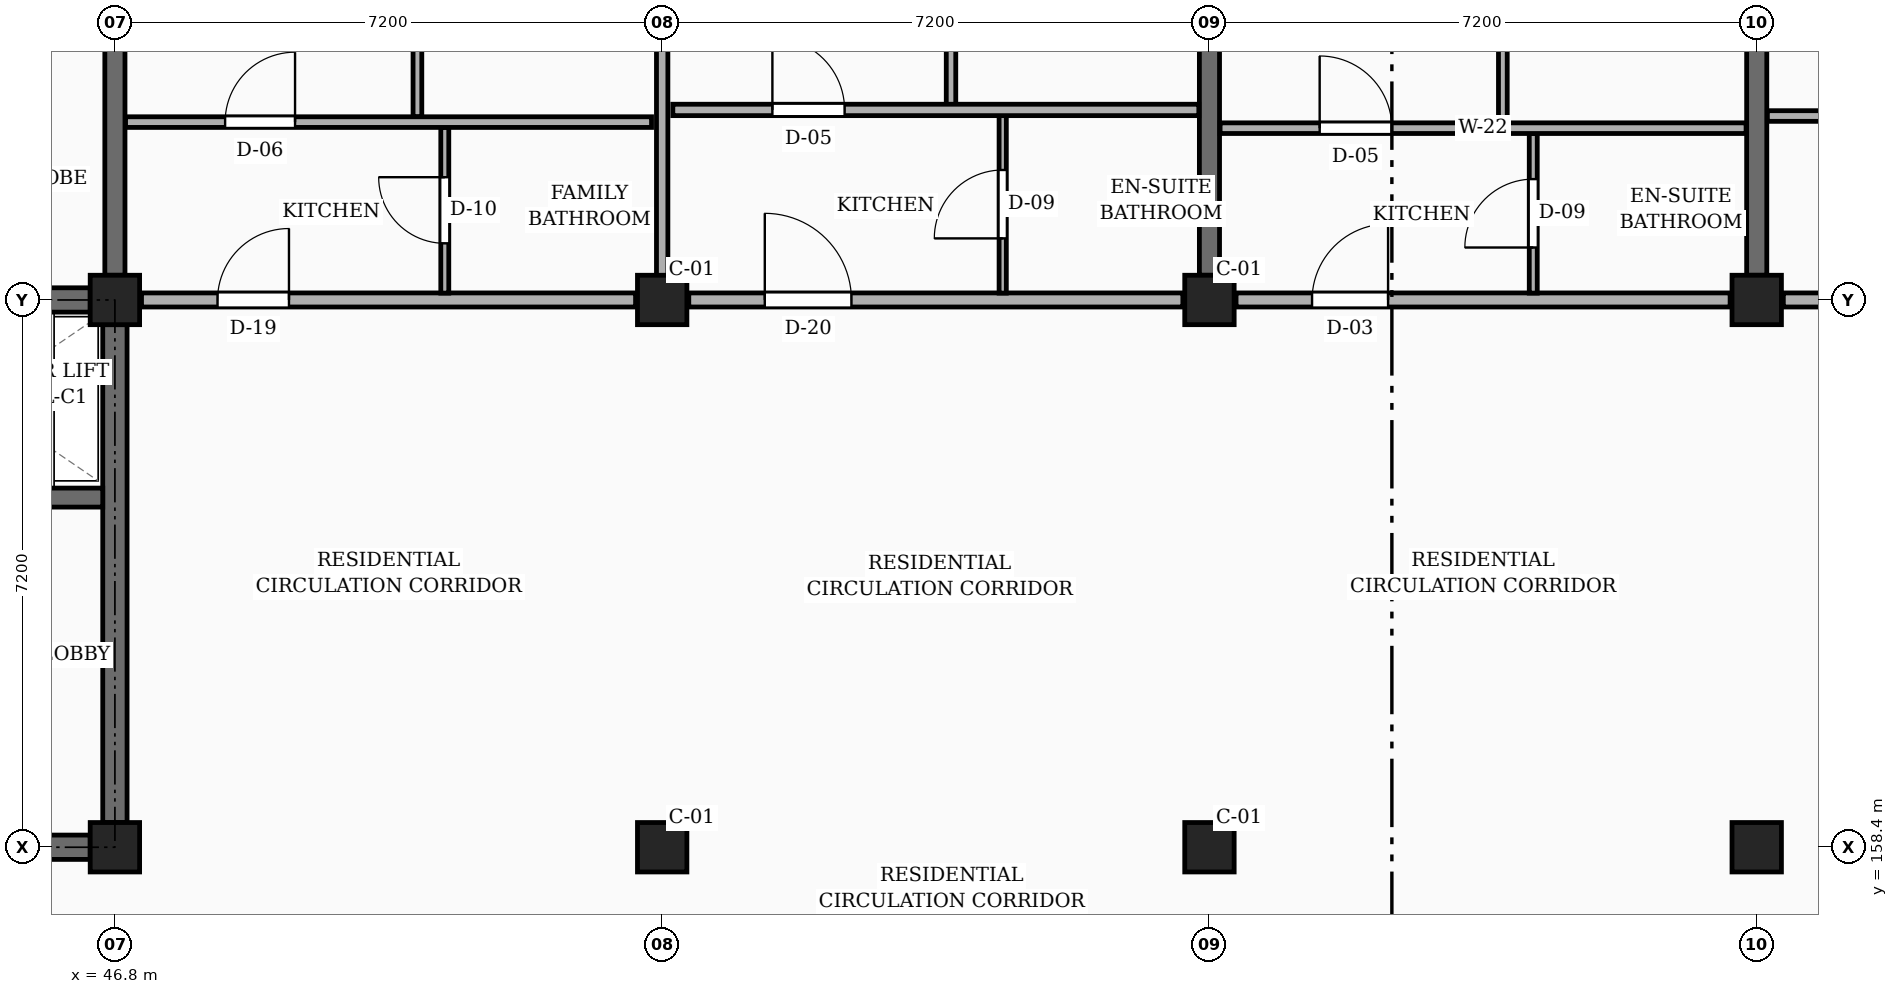
"""IFC4 building model, lengths in metres.
Left out: names, types, materials, properties, quantities, classifications, styles, units other than length and angle.
Written with IfcOpenShell. Run it as: python <this file> out.ifc"""

import sys

from ifc_helpers import new_model, si_unit, direction, frame, frame_2d, origin, origin_2d, place, context, subcontext, project, spatial, rectangle, extrude, element, fill, save


model = new_model("IFC4")
c1 = context("Model", 3, precision=1e-05, world=origin(), true_north=direction((0.0, 1.0)))
c2 = subcontext(c1, "Body", "Model", "MODEL_VIEW")
j1 = project(units=[si_unit("LENGTHUNIT", "METRE"), si_unit("PLANEANGLEUNIT", "RADIAN")], contexts=[c1])
p1 = place(None, origin())
s1 = spatial("IfcSite", under=j1, at=p1, CompositionType="ELEMENT")
p2 = place(p1, origin())
s2 = spatial("IfcBuilding", under=s1, at=p2, CompositionType="ELEMENT")
p3 = place(p2, origin())
s3 = spatial("IfcBuildingStorey", under=s2, at=p3, CompositionType="ELEMENT", Elevation=0.0)
for number, where, z_axis, x_axis in (
    (1, (46.8, 158.4, 0.0), (0.0, 0.0, 1.0), (1.0, 0.0, 0.0)),
    (2, (46.8, 165.6, 0.0), (0.0, 0.0, 1.0), (1.0, 0.0, 0.0)),
    (3, (54.0, 158.4, 0.0), (0.0, 0.0, 1.0), (1.0, 0.0, 0.0)),
    (4, (54.0, 165.6, 0.0), (0.0, 0.0, 1.0), (1.0, 0.0, 0.0)),
    (5, (61.2, 158.4, 0.0), (0.0, 0.0, 1.0), (1.0, 0.0, 0.0)),
    (6, (61.2, 165.6, 0.0), (0.0, 0.0, 1.0), (1.0, 0.0, 0.0)),
    (7, (68.4, 158.4, 0.0), (0.0, 0.0, 1.0), (1.0, 0.0, 0.0)),
    (8, (68.4, 165.6, 0.0), (0.0, 0.0, 1.0), (1.0, 0.0, 0.0)),
):
    element("IfcColumn", number, at=place(p3, frame(where, z_axis=z_axis, x_axis=x_axis)), inside=s3, PredefinedType="COLUMN", context=c2, shape_type="SweptSolid", body=[
        extrude(rectangle(XDim=0.65, YDim=0.65, at=origin_2d()), origin(), (0.0, 0.0, 1.0), 4.5),
    ])
for number, where, z_axis, x_axis in (
    (9, (46.8, 165.925, 0.0), (0.0, 0.0, 1.0), (0.0, 1.0, 0.0)),
    (10, (61.2, 165.925, 0.0), (0.0, 0.0, 1.0), (0.0, 1.0, 0.0)),
    (11, (68.4, 165.925, 0.0), (0.0, 0.0, 1.0), (0.0, 1.0, 0.0)),
):
    element("IfcWall", number, at=place(p3, frame(where, z_axis=z_axis, x_axis=x_axis)), inside=s3, PredefinedType="SOLIDWALL", context=c2, shape_type="SweptSolid", body=[
        extrude(rectangle(XDim=6.575, YDim=0.265, at=frame_2d((3.288, 0.0))), origin(), (0.0, 0.0, 1.0), 3.535),
    ])
p4 = place(p3, frame((39.925, 165.6, 0.0), z_axis=(0.0, 0.0, 1.0), x_axis=(1.0, 0.0, 0.0)))
e12 = element("IfcWall", 12, at=p4, inside=s3, PredefinedType="SHEAR", context=c2, shape_type="SweptSolid", body=[
    extrude(rectangle(XDim=6.55, YDim=0.32, at=frame_2d((3.275, 0.0))), origin(), (0.0, 0.0, 1.0), 4.235),
])
p5 = place(p3, frame((46.8, 158.725, 0.0), z_axis=(0.0, 0.0, 1.0), x_axis=(0.0, 1.0, 0.0)))
e13 = element("IfcWall", 13, at=p5, inside=s3, PredefinedType="SHEAR", context=c2, shape_type="SweptSolid", body=[
    extrude(rectangle(XDim=6.55, YDim=0.32, at=frame_2d((3.275, 0.0))), origin(), (0.0, 0.0, 1.0), 4.235),
])
p6 = place(p3, frame((39.925, 158.4, 0.0), z_axis=(0.0, 0.0, 1.0), x_axis=(1.0, 0.0, 0.0)))
e14 = element("IfcWall", 14, at=p6, inside=s3, PredefinedType="SHEAR", context=c2, shape_type="SweptSolid", body=[
    extrude(rectangle(XDim=6.55, YDim=0.32, at=frame_2d((3.275, 0.0))), origin(), (0.0, 0.0, 1.0), 4.235),
])
p7 = place(p6, frame((4.425, 0.0, 0.0)))
e15 = element("IfcOpeningElement", 15, at=p7, cuts=e14, PredefinedType="OPENING", context=c2, shape_type="SweptSolid", body=[
    extrude(rectangle(XDim=1.1, YDim=2.15, at=frame_2d((0.55, 1.075))), frame((0.0, 0.17, 0.0), z_axis=(0.0, -1.0, 0.0), x_axis=(1.0, 0.0, 0.0)), (0.0, 0.0, 1.0), 0.34),
])
p8 = place(p3, frame((43.325, 163.0, 0.0), z_axis=(0.0, 0.0, 1.0), x_axis=(1.0, 0.0, 0.0)))
e16 = element("IfcWall", 16, at=p8, inside=s3, PredefinedType="SHEAR", context=c2, shape_type="SweptSolid", body=[
    extrude(rectangle(XDim=3.315, YDim=0.25, at=frame_2d((1.657, 0.0))), origin(), (0.0, 0.0, 1.0), 4.235),
])
p9 = place(p8, frame((1.1, 0.0, 0.0)))
e17 = element("IfcOpeningElement", 17, at=p9, cuts=e16, PredefinedType="OPENING", context=c2, shape_type="SweptSolid", body=[
    extrude(rectangle(XDim=1.0, YDim=2.2, at=frame_2d((0.5, 1.1))), frame((0.0, 0.135, 0.0), z_axis=(0.0, -1.0, 0.0), x_axis=(1.0, 0.0, 0.0)), (0.0, 0.0, 1.0), 0.27),
])
p10 = place(p3, frame((47.15, 165.6, 0.0), z_axis=(0.0, 0.0, 1.0), x_axis=(1.0, 0.0, 0.0)))
e18 = element("IfcWall", 18, at=p10, inside=s3, PredefinedType="PARTITIONING", context=c2, shape_type="SweptSolid", body=[
    extrude(rectangle(XDim=6.5, YDim=0.185, at=frame_2d((3.25, 0.0))), origin(), (0.0, 0.0, 1.0), 3.435),
])
p11 = place(p10, frame((1.0, 0.0, 0.0)))
e19 = element("IfcOpeningElement", 19, at=p11, cuts=e18, PredefinedType="OPENING", context=c2, shape_type="SweptSolid", body=[
    extrude(rectangle(XDim=0.94, YDim=2.12, at=frame_2d((0.47, 1.06))), frame((0.0, 0.103, 0.0), z_axis=(0.0, -1.0, 0.0), x_axis=(1.0, 0.0, 0.0)), (0.0, 0.0, 1.0), 0.205),
])
p12 = place(p3, frame((54.35, 165.6, 0.0), z_axis=(0.0, 0.0, 1.0), x_axis=(1.0, 0.0, 0.0)))
e20 = element("IfcWall", 20, at=p12, inside=s3, PredefinedType="PARTITIONING", context=c2, shape_type="SweptSolid", body=[
    extrude(rectangle(XDim=6.5, YDim=0.185, at=frame_2d((3.25, 0.0))), origin(), (0.0, 0.0, 1.0), 3.435),
])
p13 = place(p12, frame((1.0, 0.0, 0.0)))
e21 = element("IfcOpeningElement", 21, at=p13, cuts=e20, PredefinedType="OPENING", context=c2, shape_type="SweptSolid", body=[
    extrude(rectangle(XDim=1.14, YDim=2.18, at=frame_2d((0.57, 1.09))), frame((0.0, 0.103, 0.0), z_axis=(0.0, -1.0, 0.0), x_axis=(1.0, 0.0, 0.0)), (0.0, 0.0, 1.0), 0.205),
])
p14 = place(p3, frame((61.55, 165.6, 0.0), z_axis=(0.0, 0.0, 1.0), x_axis=(1.0, 0.0, 0.0)))
e22 = element("IfcWall", 22, at=p14, inside=s3, PredefinedType="PARTITIONING", context=c2, shape_type="SweptSolid", body=[
    extrude(rectangle(XDim=6.5, YDim=0.185, at=frame_2d((3.25, 0.0))), origin(), (0.0, 0.0, 1.0), 3.435),
])
p15 = place(p14, frame((1.0, 0.0, 0.0)))
e23 = element("IfcOpeningElement", 23, at=p15, cuts=e22, PredefinedType="OPENING", context=c2, shape_type="SweptSolid", body=[
    extrude(rectangle(XDim=1.0, YDim=2.15, at=frame_2d((0.5, 1.075))), frame((0.0, 0.103, 0.0), z_axis=(0.0, -1.0, 0.0), x_axis=(1.0, 0.0, 0.0)), (0.0, 0.0, 1.0), 0.205),
])
p16 = place(p3, frame((68.75, 165.6, 0.0), z_axis=(0.0, 0.0, 1.0), x_axis=(1.0, 0.0, 0.0)))
e24 = element("IfcWall", 24, at=p16, inside=s3, PredefinedType="PARTITIONING", context=c2, shape_type="SweptSolid", body=[
    extrude(rectangle(XDim=6.5, YDim=0.185, at=frame_2d((3.25, 0.0))), origin(), (0.0, 0.0, 1.0), 3.435),
])
p17 = place(p16, frame((1.0, 0.0, 0.0)))
e25 = element("IfcOpeningElement", 25, at=p17, cuts=e24, PredefinedType="OPENING", context=c2, shape_type="SweptSolid", body=[
    extrude(rectangle(XDim=0.94, YDim=2.12, at=frame_2d((0.47, 1.06))), frame((0.0, 0.103, 0.0), z_axis=(0.0, -1.0, 0.0), x_axis=(1.0, 0.0, 0.0)), (0.0, 0.0, 1.0), 0.205),
])
p18 = place(p3, frame((54.0, 165.69, 0.0), z_axis=(0.0, 0.0, 1.0), x_axis=(0.0, 1.0, 0.0)))
e26 = element("IfcWall", 26, at=p18, inside=s3, PredefinedType="PARTITIONING", context=c2, shape_type="SweptSolid", body=[
    extrude(rectangle(XDim=6.935, YDim=0.15, at=frame_2d((3.468, 0.0))), origin(), (0.0, 0.0, 1.0), 3.485),
])
p19 = place(p3, frame((50.78, 168.01, 0.0), z_axis=(0.0, 0.0, 1.0), x_axis=(0.0, 1.0, 0.0)))
e27 = element("IfcWall", 27, at=p19, inside=s3, PredefinedType="PARTITIONING", context=c2, shape_type="SweptSolid", body=[
    extrude(rectangle(XDim=4.615, YDim=0.115, at=frame_2d((2.308, 0.0))), origin(), (0.0, 0.0, 1.0), 3.67),
])
p20 = place(p19, frame((1.867, 0.0, 0.0)))
e28 = element("IfcOpeningElement", 28, at=p20, cuts=e27, PredefinedType="OPENING", context=c2, shape_type="SweptSolid", body=[
    extrude(rectangle(XDim=0.88, YDim=2.08, at=frame_2d((0.44, 1.04))), frame((0.0, 0.067, 0.0), z_axis=(0.0, -1.0, 0.0), x_axis=(1.0, 0.0, 0.0)), (0.0, 0.0, 1.0), 0.135),
])
p21 = place(p3, frame((51.14, 165.69, 0.0), z_axis=(0.0, 0.0, 1.0), x_axis=(0.0, 1.0, 0.0)))
e29 = element("IfcWall", 29, at=p21, inside=s3, PredefinedType="PARTITIONING", context=c2, shape_type="SweptSolid", body=[
    extrude(rectangle(XDim=2.18, YDim=0.105, at=frame_2d((1.09, 0.0))), origin(), (0.0, 0.0, 1.0), 3.67),
])
p22 = place(p21, frame((0.655, 0.0, 0.0)))
e30 = element("IfcOpeningElement", 30, at=p22, cuts=e29, PredefinedType="OPENING", context=c2, shape_type="SweptSolid", body=[
    extrude(rectangle(XDim=0.87, YDim=2.05, at=frame_2d((0.435, 1.025))), frame((0.0, 0.062, 0.0), z_axis=(0.0, -1.0, 0.0), x_axis=(1.0, 0.0, 0.0)), (0.0, 0.0, 1.0), 0.125),
])
p23 = place(p3, frame((46.94, 167.94, 0.0), z_axis=(0.0, 0.0, 1.0), x_axis=(1.0, 0.0, 0.0)))
e31 = element("IfcWall", 31, at=p23, inside=s3, PredefinedType="PARTITIONING", context=c2, shape_type="SweptSolid", body=[
    extrude(rectangle(XDim=6.92, YDim=0.14, at=frame_2d((3.46, 0.0))), origin(), (0.0, 0.0, 1.0), 3.67),
])
p24 = place(p23, frame((1.31, 0.0, 0.0)))
e32 = element("IfcOpeningElement", 32, at=p24, cuts=e31, PredefinedType="OPENING", context=c2, shape_type="SweptSolid", body=[
    extrude(rectangle(XDim=0.92, YDim=2.1, at=frame_2d((0.46, 1.05))), frame((0.0, 0.08, 0.0), z_axis=(0.0, -1.0, 0.0), x_axis=(1.0, 0.0, 0.0)), (0.0, 0.0, 1.0), 0.16),
])
p25 = place(p3, frame((57.8, 168.17, 0.0), z_axis=(0.0, 0.0, 1.0), x_axis=(0.0, 1.0, 0.0)))
e33 = element("IfcWall", 33, at=p25, inside=s3, PredefinedType="PARTITIONING", context=c2, shape_type="SweptSolid", body=[
    extrude(rectangle(XDim=4.455, YDim=0.125, at=frame_2d((2.228, 0.0))), origin(), (0.0, 0.0, 1.0), 3.67),
])
p26 = place(p25, frame((1.778, 0.0, 0.0)))
e34 = element("IfcOpeningElement", 34, at=p26, cuts=e33, PredefinedType="OPENING", context=c2, shape_type="SweptSolid", body=[
    extrude(rectangle(XDim=0.9, YDim=2.1, at=frame_2d((0.45, 1.05))), frame((0.0, 0.073, 0.0), z_axis=(0.0, -1.0, 0.0), x_axis=(1.0, 0.0, 0.0)), (0.0, 0.0, 1.0), 0.145),
])
p27 = place(p3, frame((58.48, 165.69, 0.0), z_axis=(0.0, 0.0, 1.0), x_axis=(0.0, 1.0, 0.0)))
e35 = element("IfcWall", 35, at=p27, inside=s3, PredefinedType="PARTITIONING", context=c2, shape_type="SweptSolid", body=[
    extrude(rectangle(XDim=2.34, YDim=0.095, at=frame_2d((1.17, 0.0))), origin(), (0.0, 0.0, 1.0), 3.67),
])
p28 = place(p27, frame((0.72, 0.0, 0.0)))
e36 = element("IfcOpeningElement", 36, at=p28, cuts=e35, PredefinedType="OPENING", context=c2, shape_type="SweptSolid", body=[
    extrude(rectangle(XDim=0.9, YDim=2.05, at=frame_2d((0.45, 1.025))), frame((0.0, 0.058, 0.0), z_axis=(0.0, -1.0, 0.0), x_axis=(1.0, 0.0, 0.0)), (0.0, 0.0, 1.0), 0.115),
])
p29 = place(p3, frame((54.14, 168.1, 0.0), z_axis=(0.0, 0.0, 1.0), x_axis=(1.0, 0.0, 0.0)))
e37 = element("IfcWall", 37, at=p29, inside=s3, PredefinedType="PARTITIONING", context=c2, shape_type="SweptSolid", body=[
    extrude(rectangle(XDim=6.92, YDim=0.15, at=frame_2d((3.46, 0.0))), origin(), (0.0, 0.0, 1.0), 3.67),
])
p30 = place(p29, frame((1.31, 0.0, 0.0)))
e38 = element("IfcOpeningElement", 38, at=p30, cuts=e37, PredefinedType="OPENING", context=c2, shape_type="SweptSolid", body=[
    extrude(rectangle(XDim=0.95, YDim=2.1, at=frame_2d((0.475, 1.05))), frame((0.0, 0.085, 0.0), z_axis=(0.0, -1.0, 0.0), x_axis=(1.0, 0.0, 0.0)), (0.0, 0.0, 1.0), 0.17),
])
p31 = place(p3, frame((65.06, 167.93, 0.0), z_axis=(0.0, 0.0, 1.0), x_axis=(0.0, 1.0, 0.0)))
e39 = element("IfcWall", 39, at=p31, inside=s3, PredefinedType="PARTITIONING", context=c2, shape_type="SweptSolid", body=[
    extrude(rectangle(XDim=4.695, YDim=0.115, at=frame_2d((2.348, 0.0))), origin(), (0.0, 0.0, 1.0), 3.67),
])
p32 = place(p31, frame((1.897, 0.0, 0.0)))
e40 = element("IfcOpeningElement", 40, at=p32, cuts=e39, PredefinedType="OPENING", context=c2, shape_type="SweptSolid", body=[
    extrude(rectangle(XDim=0.9, YDim=2.1, at=frame_2d((0.45, 1.05))), frame((0.0, 0.067, 0.0), z_axis=(0.0, -1.0, 0.0), x_axis=(1.0, 0.0, 0.0)), (0.0, 0.0, 1.0), 0.135),
])
p33 = place(p3, frame((65.46, 165.69, 0.0), z_axis=(0.0, 0.0, 1.0), x_axis=(0.0, 1.0, 0.0)))
e41 = element("IfcWall", 41, at=p33, inside=s3, PredefinedType="PARTITIONING", context=c2, shape_type="SweptSolid", body=[
    extrude(rectangle(XDim=2.1, YDim=0.105, at=frame_2d((1.05, 0.0))), origin(), (0.0, 0.0, 1.0), 3.67),
])
p34 = place(p33, frame((0.6, 0.0, 0.0)))
e42 = element("IfcOpeningElement", 42, at=p34, cuts=e41, PredefinedType="OPENING", context=c2, shape_type="SweptSolid", body=[
    extrude(rectangle(XDim=0.9, YDim=2.05, at=frame_2d((0.45, 1.025))), frame((0.0, 0.062, 0.0), z_axis=(0.0, -1.0, 0.0), x_axis=(1.0, 0.0, 0.0)), (0.0, 0.0, 1.0), 0.125),
])
p35 = place(p3, frame((61.34, 167.86, 0.0), z_axis=(0.0, 0.0, 1.0), x_axis=(1.0, 0.0, 0.0)))
e43 = element("IfcWall", 43, at=p35, inside=s3, PredefinedType="PARTITIONING", context=c2, shape_type="SweptSolid", body=[
    extrude(rectangle(XDim=6.92, YDim=0.14, at=frame_2d((3.46, 0.0))), origin(), (0.0, 0.0, 1.0), 3.67),
])
p36 = place(p35, frame((1.31, 0.0, 0.0)))
e44 = element("IfcOpeningElement", 44, at=p36, cuts=e43, PredefinedType="OPENING", context=c2, shape_type="SweptSolid", body=[
    extrude(rectangle(XDim=0.95, YDim=2.1, at=frame_2d((0.475, 1.05))), frame((0.0, 0.08, 0.0), z_axis=(0.0, -1.0, 0.0), x_axis=(1.0, 0.0, 0.0)), (0.0, 0.0, 1.0), 0.16),
])
p37 = place(p3, frame((68.54, 168.02, 0.0), z_axis=(0.0, 0.0, 1.0), x_axis=(1.0, 0.0, 0.0)))
e45 = element("IfcWall", 45, at=p37, inside=s3, PredefinedType="PARTITIONING", context=c2, shape_type="SweptSolid", body=[
    extrude(rectangle(XDim=6.885, YDim=0.14, at=frame_2d((3.442, 0.0))), origin(), (0.0, 0.0, 1.0), 3.67),
])
p38 = place(p37, frame((1.31, 0.0, 0.0)))
e46 = element("IfcOpeningElement", 46, at=p38, cuts=e45, PredefinedType="OPENING", context=c2, shape_type="SweptSolid", body=[
    extrude(rectangle(XDim=0.92, YDim=2.1, at=frame_2d((0.46, 1.05))), frame((0.0, 0.08, 0.0), z_axis=(0.0, -1.0, 0.0), x_axis=(1.0, 0.0, 0.0)), (0.0, 0.0, 1.0), 0.16),
])
p39 = place(p11, origin())
e47 = element("IfcDoor", 47, at=p39, inside=s3, OperationType="SINGLE_SWING_RIGHT", PredefinedType="DOOR", context=c2, shape_type="SweptSolid", body=[
    extrude(rectangle(XDim=0.94, YDim=2.12, at=frame_2d((0.47, 1.06))), frame((0.0, 0.025, 0.0), z_axis=(0.0, -1.0, 0.0), x_axis=(1.0, 0.0, 0.0)), (0.0, 0.0, 1.0), 0.05),
])
fill(e19, e47)
p40 = place(p13, origin())
e48 = element("IfcDoor", 48, at=p40, inside=s3, OperationType="SINGLE_SWING_LEFT", PredefinedType="DOOR", context=c2, shape_type="SweptSolid", body=[
    extrude(rectangle(XDim=1.14, YDim=2.18, at=frame_2d((0.57, 1.09))), frame((0.0, 0.025, 0.0), z_axis=(0.0, -1.0, 0.0), x_axis=(1.0, 0.0, 0.0)), (0.0, 0.0, 1.0), 0.05),
])
fill(e21, e48)
p41 = place(p15, origin())
e49 = element("IfcDoor", 49, at=p41, inside=s3, OperationType="SINGLE_SWING_RIGHT", PredefinedType="DOOR", context=c2, shape_type="SweptSolid", body=[
    extrude(rectangle(XDim=1.0, YDim=2.15, at=frame_2d((0.5, 1.075))), frame((0.0, 0.025, 0.0), z_axis=(0.0, -1.0, 0.0), x_axis=(1.0, 0.0, 0.0)), (0.0, 0.0, 1.0), 0.05),
])
fill(e23, e49)
p42 = place(p22, origin())
e50 = element("IfcDoor", 50, at=p42, inside=s3, OperationType="SINGLE_SWING_RIGHT", PredefinedType="DOOR", context=c2, shape_type="SweptSolid", body=[
    extrude(rectangle(XDim=0.87, YDim=2.05, at=frame_2d((0.435, 1.025))), frame((0.0, 0.025, 0.0), z_axis=(0.0, -1.0, 0.0), x_axis=(1.0, 0.0, 0.0)), (0.0, 0.0, 1.0), 0.05),
])
fill(e30, e50)
p43 = place(p24, origin())
e51 = element("IfcDoor", 51, at=p43, inside=s3, OperationType="SINGLE_SWING_RIGHT", PredefinedType="DOOR", context=c2, shape_type="SweptSolid", body=[
    extrude(rectangle(XDim=0.92, YDim=2.1, at=frame_2d((0.46, 1.05))), frame((0.0, 0.025, 0.0), z_axis=(0.0, -1.0, 0.0), x_axis=(1.0, 0.0, 0.0)), (0.0, 0.0, 1.0), 0.05),
])
fill(e32, e51)
p44 = place(p28, origin())
e52 = element("IfcDoor", 52, at=p44, inside=s3, OperationType="SINGLE_SWING_LEFT", PredefinedType="DOOR", context=c2, shape_type="SweptSolid", body=[
    extrude(rectangle(XDim=0.9, YDim=2.05, at=frame_2d((0.45, 1.025))), frame((0.0, 0.025, 0.0), z_axis=(0.0, -1.0, 0.0), x_axis=(1.0, 0.0, 0.0)), (0.0, 0.0, 1.0), 0.05),
])
fill(e36, e52)
p45 = place(p30, origin())
e53 = element("IfcDoor", 53, at=p45, inside=s3, OperationType="SINGLE_SWING_LEFT", PredefinedType="DOOR", context=c2, shape_type="SweptSolid", body=[
    extrude(rectangle(XDim=0.95, YDim=2.1, at=frame_2d((0.475, 1.05))), frame((0.0, 0.025, 0.0), z_axis=(0.0, -1.0, 0.0), x_axis=(1.0, 0.0, 0.0)), (0.0, 0.0, 1.0), 0.05),
])
fill(e38, e53)
p46 = place(p34, origin())
e54 = element("IfcDoor", 54, at=p46, inside=s3, OperationType="SINGLE_SWING_LEFT", PredefinedType="DOOR", context=c2, shape_type="SweptSolid", body=[
    extrude(rectangle(XDim=0.9, YDim=2.05, at=frame_2d((0.45, 1.025))), frame((0.0, 0.025, 0.0), z_axis=(0.0, -1.0, 0.0), x_axis=(1.0, 0.0, 0.0)), (0.0, 0.0, 1.0), 0.05),
])
fill(e42, e54)
p47 = place(p36, origin())
e55 = element("IfcDoor", 55, at=p47, inside=s3, OperationType="SINGLE_SWING_LEFT", PredefinedType="DOOR", context=c2, shape_type="SweptSolid", body=[
    extrude(rectangle(XDim=0.95, YDim=2.1, at=frame_2d((0.475, 1.05))), frame((0.0, 0.025, 0.0), z_axis=(0.0, -1.0, 0.0), x_axis=(1.0, 0.0, 0.0)), (0.0, 0.0, 1.0), 0.05),
])
fill(e44, e55)
save(model, sys.argv[1])
